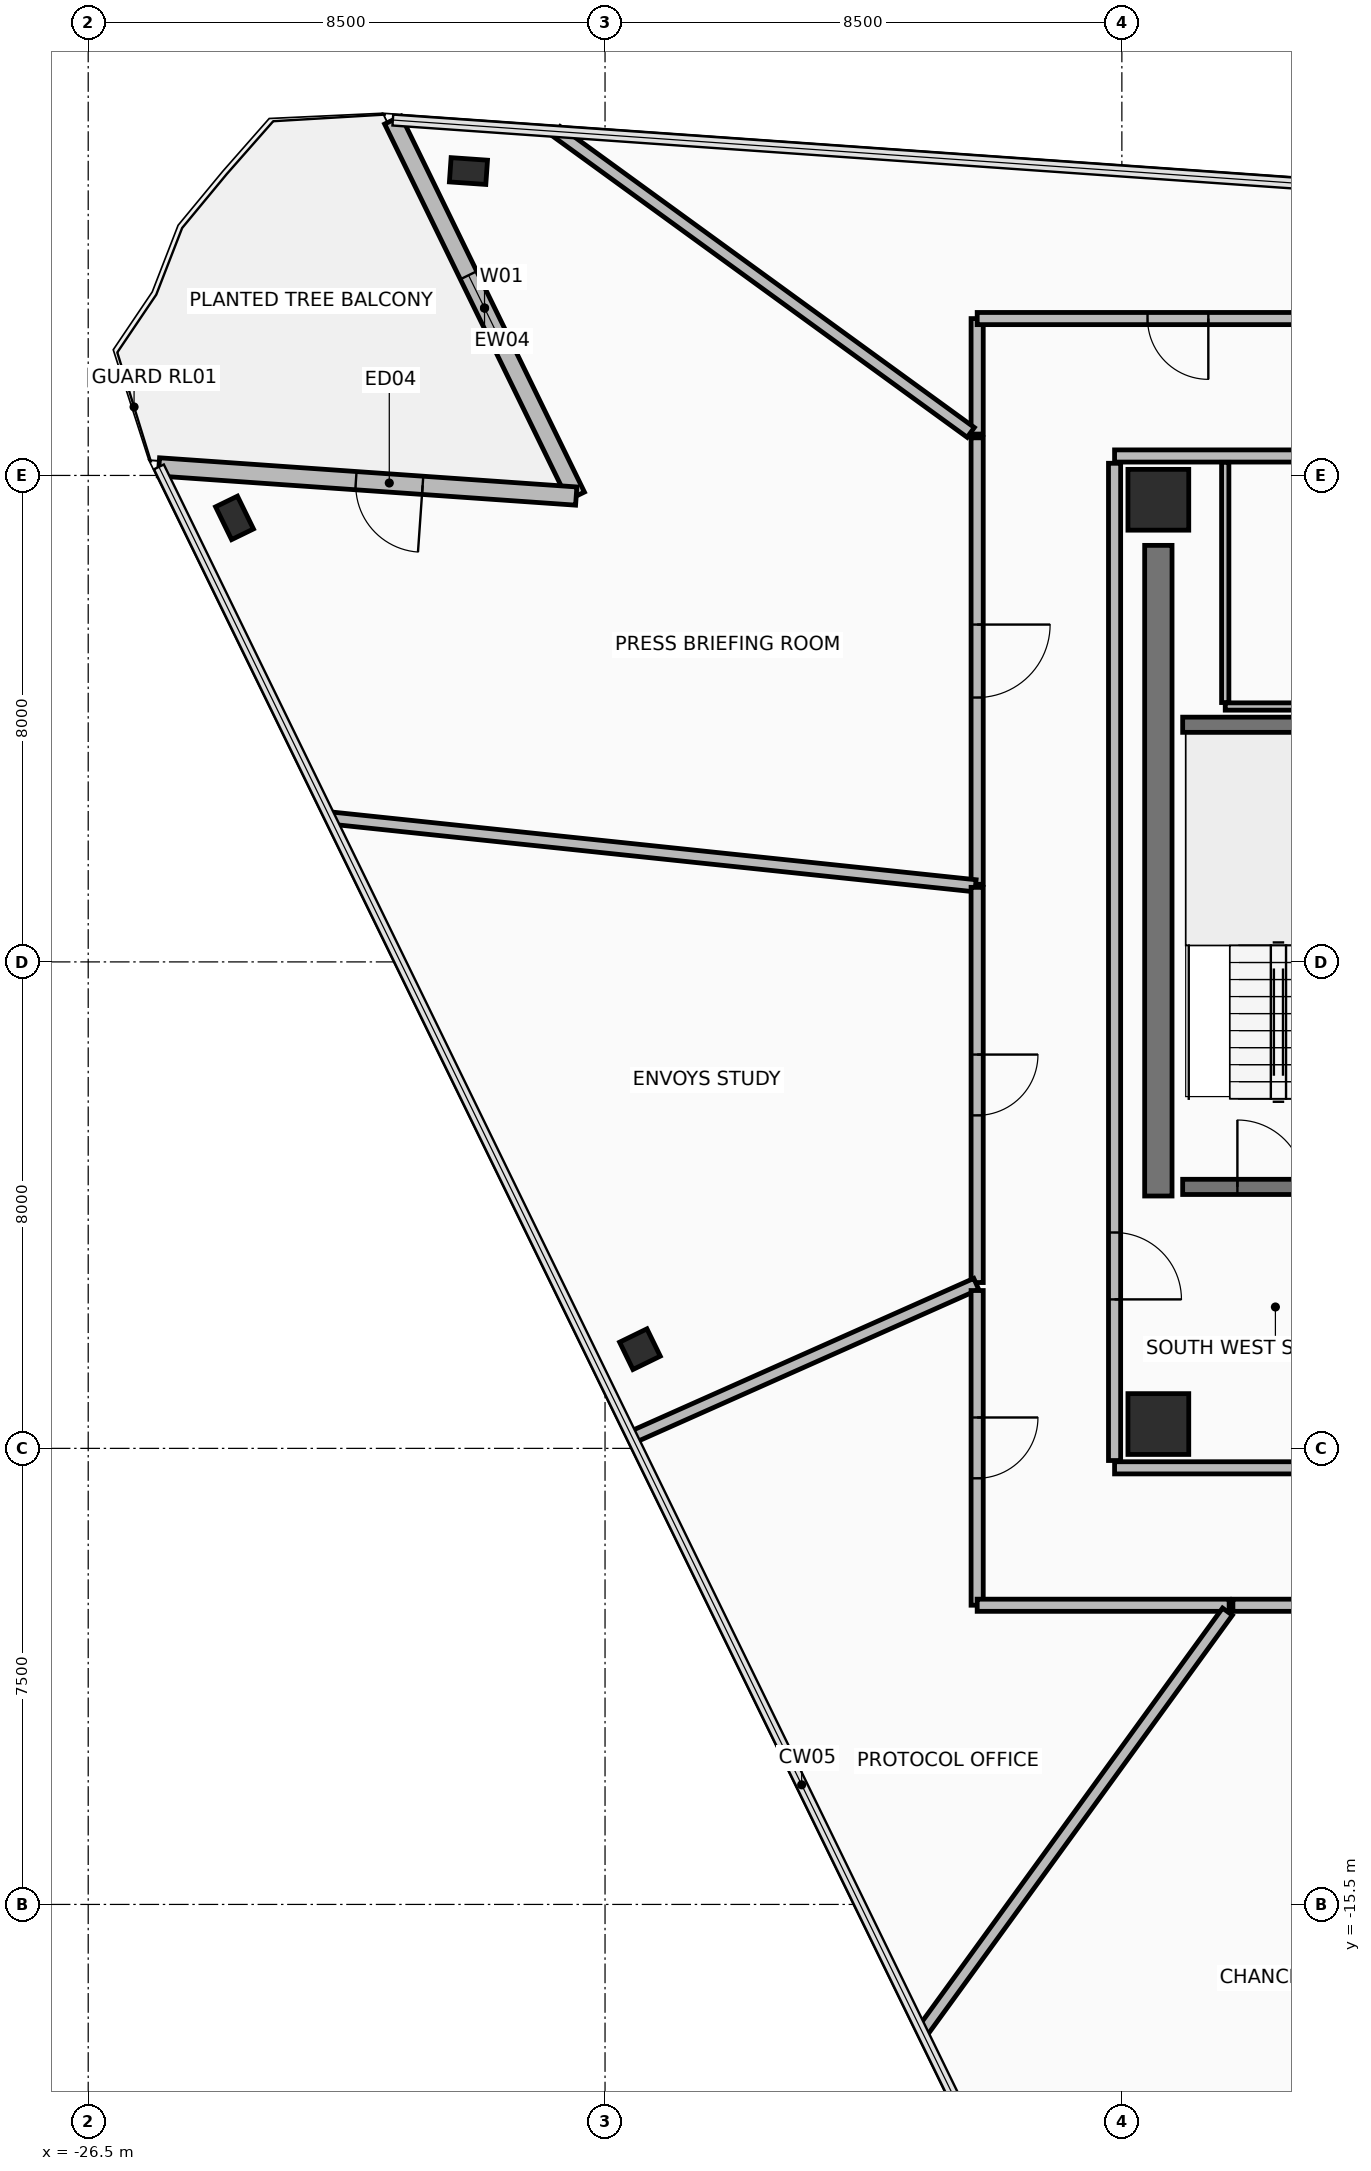
"""IFC4 building model, lengths in metres.
Left out: names, types, materials, properties, quantities, classifications, styles, units other than length and angle.
Written with IfcOpenShell. Run it as: python <this file> out.ifc"""

import sys

from ifc_helpers import new_model, si_unit, direction, frame, frame_2d, origin, origin_2d, place, context, subcontext, project, spatial, rectangle, hollow_rectangle, extrude, element, fill, save


model = new_model("IFC4")
c1 = context("Model", 3, precision=1e-05, world=origin(), true_north=direction((0.0, 1.0)))
c2 = subcontext(c1, "Body", "Model", "MODEL_VIEW")
j1 = project(units=[si_unit("LENGTHUNIT", "METRE"), si_unit("PLANEANGLEUNIT", "RADIAN")], contexts=[c1])
p1 = place(None, origin())
s1 = spatial("IfcSite", under=j1, at=p1, CompositionType="ELEMENT")
p2 = place(p1, origin())
s2 = spatial("IfcBuilding", under=s1, at=p2, CompositionType="ELEMENT")
p3 = place(p2, frame((0.0, 0.0, 227.05)))
s3 = spatial("IfcBuildingStorey", under=s2, at=p3, CompositionType="ELEMENT", Elevation=227.05)
for number, where, z_axis, x_axis in (
    (1, (-8.9, -7.6, 0.0), (0.0, 0.0, 1.0), (1.0, 0.0, 0.0)),
    (2, (-8.9, 7.6, 0.0), (0.0, 0.0, 1.0), (1.0, 0.0, 0.0)),
):
    element("IfcColumn", number, at=place(p3, frame(where, z_axis=z_axis, x_axis=x_axis)), inside=s3, PredefinedType="COLUMN", context=c2, shape_type="SweptSolid", body=[
        extrude(rectangle(XDim=1.0, YDim=1.0, at=origin_2d()), origin(), (0.0, 0.0, 1.0), 3.6),
    ])
p4 = place(p3, frame((-24.094, 7.302, -0.19), z_axis=(0.0, 0.0, 1.0), x_axis=(-0.438371146789, 0.898794046299, 0.0)))
e3 = element("IfcColumn", 3, at=p4, inside=s3, PredefinedType="COLUMN", context=c2, shape_type="SweptSolid", body=[
    extrude(hollow_rectangle(XDim=0.4, YDim=0.6, WallThickness=0.03, at=origin_2d()), origin(), (0.0, 0.0, 1.0), 3.79),
])
p5 = place(p3, frame((-17.426, -6.369, -0.19), z_axis=(0.0, 0.0, 1.0), x_axis=(-0.438371146789, 0.898794046299, 0.0)))
e4 = element("IfcColumn", 4, at=p5, inside=s3, PredefinedType="COLUMN", context=c2, shape_type="SweptSolid", body=[
    extrude(hollow_rectangle(XDim=0.5, YDim=0.5, WallThickness=0.032, at=origin_2d()), origin(), (0.0, 0.0, 1.0), 3.79),
])
p6 = place(p3, frame((-20.246, 13.006, 0.0), z_axis=(0.0, 0.0, 1.0), x_axis=(-0.99756405026, 0.069756473744, 0.0)))
e5 = element("IfcColumn", 5, at=p6, inside=s3, PredefinedType="COLUMN", context=c2, shape_type="SweptSolid", body=[
    extrude(hollow_rectangle(XDim=0.4, YDim=0.6, WallThickness=0.03, at=origin_2d()), origin(), (0.0, 0.0, 1.0), 3.6),
])
p7 = place(p3, frame((-21.49, 13.844, 0.0), z_axis=(0.0, 0.0, 1.0), x_axis=(0.438391471143, -0.898784133165, 0.0)))
e6 = element("IfcWall", 6, at=p7, inside=s3, PredefinedType="STANDARD", context=c2, shape_type="SweptSolid", body=[
    extrude(rectangle(XDim=6.88, YDim=0.3, at=frame_2d((3.44, 0.0))), origin(), (0.0, 0.0, 1.0), 2.765),
])
p8 = place(p7, frame((2.84, 0.0, 0.485)))
e7 = element("IfcOpeningElement", 7, at=p8, cuts=e6, PredefinedType="OPENING", context=c2, shape_type="SweptSolid", body=[
    extrude(rectangle(XDim=1.2, YDim=2.1, at=frame_2d((0.6, 1.05))), frame((0.0, 0.16, 0.0), z_axis=(0.0, -1.0, 0.0), x_axis=(1.0, 0.0, 0.0)), (0.0, 0.0, 1.0), 0.32),
])
p9 = place(p3, frame((-18.474, 7.661, 0.0), z_axis=(0.0, 0.0, 1.0), x_axis=(-0.997565982203, 0.069728840176, 0.0)))
e8 = element("IfcWall", 8, at=p9, inside=s3, PredefinedType="STANDARD", context=c2, shape_type="SweptSolid", body=[
    extrude(rectangle(XDim=6.88, YDim=0.3, at=frame_2d((3.44, 0.0))), origin(), (0.0, 0.0, 1.0), 2.765),
])
p10 = place(p9, frame((2.532, 0.0, 0.0)))
e9 = element("IfcOpeningElement", 9, at=p10, cuts=e8, PredefinedType="OPENING", context=c2, shape_type="SweptSolid", body=[
    extrude(rectangle(XDim=1.1, YDim=2.2, at=frame_2d((0.55, 1.1))), frame((0.0, 0.16, 0.0), z_axis=(0.0, -1.0, 0.0), x_axis=(1.0, 0.0, 0.0)), (0.0, 0.0, 1.0), 0.32),
])
p11 = place(p3, frame((-8.9, -3.85, 0.0), z_axis=(0.0, 0.0, 1.0), x_axis=(0.0, 1.0, 0.0)))
e10 = element("IfcWall", 10, at=p11, inside=s3, PredefinedType="SHEAR", context=c2, shape_type="SweptSolid", body=[
    extrude(rectangle(XDim=10.7, YDim=0.45, at=frame_2d((5.35, 0.0))), origin(), (0.0, 0.0, 1.0), 3.42),
])
p12 = place(p3, frame((-9.62, -8.32, 0.0), z_axis=(0.0, 0.0, 1.0), x_axis=(1.0, 0.0, 0.0)))
e11 = element("IfcWall", 11, at=p12, inside=s3, PredefinedType="PARTITIONING", context=c2, shape_type="SweptSolid", body=[
    extrude(rectangle(XDim=19.24, YDim=0.2, at=frame_2d((9.62, 0.0))), origin(), (0.0, 0.0, 1.0), 2.915),
])
p13 = place(p12, frame((7.37, 0.0, 0.0)))
e12 = element("IfcOpeningElement", 12, at=p13, cuts=e11, PredefinedType="OPENING", context=c2, shape_type="SweptSolid", body=[
    extrude(rectangle(XDim=0.9, YDim=2.1, at=frame_2d((0.45, 1.05))), frame((0.0, 0.11, 0.0), z_axis=(0.0, -1.0, 0.0), x_axis=(1.0, 0.0, 0.0)), (0.0, 0.0, 1.0), 0.22),
])
p14 = place(p12, frame((10.77, 0.0, 0.0)))
e13 = element("IfcOpeningElement", 13, at=p14, cuts=e11, PredefinedType="OPENING", context=c2, shape_type="SweptSolid", body=[
    extrude(rectangle(XDim=0.9, YDim=2.1, at=frame_2d((0.45, 1.05))), frame((0.0, 0.11, 0.0), z_axis=(0.0, -1.0, 0.0), x_axis=(1.0, 0.0, 0.0)), (0.0, 0.0, 1.0), 0.22),
])
p15 = place(p3, frame((9.62, 8.32, 0.0), z_axis=(0.0, 0.0, 1.0), x_axis=(-1.0, 0.0, 0.0)))
e14 = element("IfcWall", 14, at=p15, inside=s3, PredefinedType="PARTITIONING", context=c2, shape_type="SweptSolid", body=[
    extrude(rectangle(XDim=19.24, YDim=0.2, at=frame_2d((9.62, 0.0))), origin(), (0.0, 0.0, 1.0), 2.915),
])
p16 = place(p15, frame((10.97, 0.0, 0.0)))
e15 = element("IfcOpeningElement", 15, at=p16, cuts=e14, PredefinedType="OPENING", context=c2, shape_type="SweptSolid", body=[
    extrude(rectangle(XDim=0.9, YDim=2.1, at=frame_2d((0.45, 1.05))), frame((0.0, 0.11, 0.0), z_axis=(0.0, -1.0, 0.0), x_axis=(1.0, 0.0, 0.0)), (0.0, 0.0, 1.0), 0.22),
])
p17 = place(p15, frame((7.57, 0.0, 0.0)))
e16 = element("IfcOpeningElement", 16, at=p17, cuts=e14, PredefinedType="OPENING", context=c2, shape_type="SweptSolid", body=[
    extrude(rectangle(XDim=0.9, YDim=2.1, at=frame_2d((0.45, 1.05))), frame((0.0, 0.11, 0.0), z_axis=(0.0, -1.0, 0.0), x_axis=(1.0, 0.0, 0.0)), (0.0, 0.0, 1.0), 0.22),
])
p18 = place(p15, frame((15.02, 0.0, 0.0)))
e17 = element("IfcOpeningElement", 17, at=p18, cuts=e14, PredefinedType="OPENING", context=c2, shape_type="SweptSolid", body=[
    extrude(rectangle(XDim=0.9, YDim=2.1, at=frame_2d((0.45, 1.05))), frame((0.0, 0.11, 0.0), z_axis=(0.0, -1.0, 0.0), x_axis=(1.0, 0.0, 0.0)), (0.0, 0.0, 1.0), 0.22),
])
p19 = place(p3, frame((-9.62, 8.2, 0.0), z_axis=(0.0, 0.0, 1.0), x_axis=(0.0, -1.0, 0.0)))
e18 = element("IfcWall", 18, at=p19, inside=s3, PredefinedType="PARTITIONING", context=c2, shape_type="SweptSolid", body=[
    extrude(rectangle(XDim=16.4, YDim=0.2, at=frame_2d((8.2, 0.0))), origin(), (0.0, 0.0, 1.0), 2.765),
])
p20 = place(p19, frame((12.65, 0.0, 0.0)))
e19 = element("IfcOpeningElement", 19, at=p20, cuts=e18, PredefinedType="OPENING", context=c2, shape_type="SweptSolid", body=[
    extrude(rectangle(XDim=1.1, YDim=2.15, at=frame_2d((0.55, 1.075))), frame((0.0, 0.11, 0.0), z_axis=(0.0, -1.0, 0.0), x_axis=(1.0, 0.0, 0.0)), (0.0, 0.0, 1.0), 0.22),
])
p21 = place(p3, frame((-8.5, -3.7, 0.0), z_axis=(0.0, 0.0, 1.0), x_axis=(1.0, 0.0, 0.0)))
e20 = element("IfcWall", 20, at=p21, inside=s3, PredefinedType="SHEAR", context=c2, shape_type="SweptSolid", body=[
    extrude(rectangle(XDim=2.95, YDim=0.25, at=frame_2d((1.475, 0.0))), origin(), (0.0, 0.0, 1.0), 3.42),
])
p22 = place(p21, frame((0.9, 0.0, 0.0)))
e21 = element("IfcOpeningElement", 21, at=p22, cuts=e20, PredefinedType="OPENING", context=c2, shape_type="SweptSolid", body=[
    extrude(rectangle(XDim=1.1, YDim=2.15, at=frame_2d((0.55, 1.075))), frame((0.0, 0.135, 0.0), z_axis=(0.0, -1.0, 0.0), x_axis=(1.0, 0.0, 0.0)), (0.0, 0.0, 1.0), 0.27),
])
p23 = place(p3, frame((-8.5, 3.9, 0.0), z_axis=(0.0, 0.0, 1.0), x_axis=(1.0, 0.0, 0.0)))
e22 = element("IfcWall", 22, at=p23, inside=s3, PredefinedType="SHEAR", context=c2, shape_type="SweptSolid", body=[
    extrude(rectangle(XDim=2.95, YDim=0.25, at=frame_2d((1.475, 0.0))), origin(), (0.0, 0.0, 1.0), 3.42),
])
p24 = place(p3, frame((-7.8, 4.2, 0.0), z_axis=(0.0, 0.0, 1.0), x_axis=(1.0, 0.0, 0.0)))
e23 = element("IfcWall", 23, at=p24, inside=s3, PredefinedType="PARTITIONING", context=c2, shape_type="SweptSolid", body=[
    extrude(rectangle(XDim=3.9, YDim=0.12, at=frame_2d((1.95, 0.0))), origin(), (0.0, 0.0, 1.0), 3.42),
])
p25 = place(p3, frame((-7.8, 8.215, 0.0), z_axis=(0.0, 0.0, 1.0), x_axis=(0.0, -1.0, 0.0)))
e24 = element("IfcWall", 24, at=p25, inside=s3, PredefinedType="PARTITIONING", context=c2, shape_type="SweptSolid", body=[
    extrude(rectangle(XDim=3.95, YDim=0.12, at=frame_2d((1.975, 0.0))), origin(), (0.0, 0.0, 1.0), 2.715),
])
p26 = place(p3, frame((-11.88, 10.579, 0.0), z_axis=(0.0, 0.0, 1.0), x_axis=(0.0, -1.0, 0.0)))
e25 = element("IfcWall", 25, at=p26, inside=s3, PredefinedType="PARTITIONING", context=c2, shape_type="SweptSolid", body=[
    extrude(rectangle(XDim=1.899, YDim=0.2, at=frame_2d((0.949, 0.0))), origin(), (0.0, 0.0, 1.0), 2.915),
])
p27 = place(p3, frame((-11.985, 8.708, 0.0), z_axis=(0.0, 0.0, 1.0), x_axis=(-0.809008125834, 0.587797458599, 0.0)))
e26 = element("IfcWall", 26, at=p27, inside=s3, PredefinedType="PARTITIONING", context=c2, shape_type="SweptSolid", body=[
    extrude(rectangle(XDim=8.419, YDim=0.2, at=frame_2d((4.209, 0.0))), origin(), (0.0, 0.0, 1.0), 2.765),
])
p28 = place(p3, frame((-5.277, 10.58, 0.0), z_axis=(0.0, 0.0, 1.0), x_axis=(-1.0, 0.0, 0.0)))
e27 = element("IfcWall", 27, at=p28, inside=s3, PredefinedType="PARTITIONING", context=c2, shape_type="SweptSolid", body=[
    extrude(rectangle(XDim=6.602, YDim=0.2, at=frame_2d((3.301, 0.0))), origin(), (0.0, 0.0, 1.0), 2.915),
])
p29 = place(p28, frame((2.801, 0.0, 0.0)))
e28 = element("IfcOpeningElement", 28, at=p29, cuts=e27, PredefinedType="OPENING", context=c2, shape_type="SweptSolid", body=[
    extrude(rectangle(XDim=1.0, YDim=2.15, at=frame_2d((0.5, 1.075))), frame((0.0, 0.11, 0.0), z_axis=(0.0, -1.0, 0.0), x_axis=(1.0, 0.0, 0.0)), (0.0, 0.0, 1.0), 0.22),
])
p30 = place(p3, frame((-11.88, 8.619, 0.0), z_axis=(0.0, 0.0, 1.0), x_axis=(0.0, -1.0, 0.0)))
e29 = element("IfcWall", 29, at=p30, inside=s3, PredefinedType="PARTITIONING", context=c2, shape_type="SweptSolid", body=[
    extrude(rectangle(XDim=7.342, YDim=0.2, at=frame_2d((3.671, 0.0))), origin(), (0.0, 0.0, 1.0), 2.765),
])
p31 = place(p30, frame((3.071, 0.0, 0.0)))
e30 = element("IfcOpeningElement", 30, at=p31, cuts=e29, PredefinedType="OPENING", context=c2, shape_type="SweptSolid", body=[
    extrude(rectangle(XDim=1.2, YDim=2.15, at=frame_2d((0.6, 1.075))), frame((0.0, 0.11, 0.0), z_axis=(0.0, -1.0, 0.0), x_axis=(1.0, 0.0, 0.0)), (0.0, 0.0, 1.0), 0.22),
])
p32 = place(p3, frame((-11.908, 1.251, 0.0), z_axis=(0.0, 0.0, 1.0), x_axis=(-0.994522384662, 0.104523807841, 0.0)))
e31 = element("IfcWall", 31, at=p32, inside=s3, PredefinedType="PARTITIONING", context=c2, shape_type="SweptSolid", body=[
    extrude(rectangle(XDim=10.658, YDim=0.2, at=frame_2d((5.329, 0.0))), origin(), (0.0, 0.0, 1.0), 2.765),
])
p33 = place(p3, frame((-11.88, 1.226, 0.0), z_axis=(0.0, 0.0, 1.0), x_axis=(0.0, -1.0, 0.0)))
e32 = element("IfcWall", 32, at=p33, inside=s3, PredefinedType="PARTITIONING", context=c2, shape_type="SweptSolid", body=[
    extrude(rectangle(XDim=6.499, YDim=0.2, at=frame_2d((3.25, 0.0))), origin(), (0.0, 0.0, 1.0), 3.42),
])
p34 = place(p33, frame((2.75, 0.0, 0.0)))
e33 = element("IfcOpeningElement", 33, at=p34, cuts=e32, PredefinedType="OPENING", context=c2, shape_type="SweptSolid", body=[
    extrude(rectangle(XDim=1.0, YDim=2.15, at=frame_2d((0.5, 1.075))), frame((0.0, 0.11, 0.0), z_axis=(0.0, -1.0, 0.0), x_axis=(1.0, 0.0, 0.0)), (0.0, 0.0, 1.0), 0.22),
])
p35 = place(p3, frame((-11.895, -5.296, 0.0), z_axis=(0.0, 0.0, 1.0), x_axis=(-0.913548703363, -0.406729352991, 0.0)))
e34 = element("IfcWall", 34, at=p35, inside=s3, PredefinedType="PARTITIONING", context=c2, shape_type="SweptSolid", body=[
    extrude(rectangle(XDim=6.171, YDim=0.2, at=frame_2d((3.085, 0.0))), origin(), (0.0, 0.0, 1.0), 2.765),
])
p36 = place(p3, frame((-11.88, -5.404, 0.0), z_axis=(0.0, 0.0, 1.0), x_axis=(0.0, -1.0, 0.0)))
e35 = element("IfcWall", 35, at=p36, inside=s3, PredefinedType="PARTITIONING", context=c2, shape_type="SweptSolid", body=[
    extrude(rectangle(XDim=5.175, YDim=0.2, at=frame_2d((2.587, 0.0))), origin(), (0.0, 0.0, 1.0), 2.915),
])
p37 = place(p36, frame((2.088, 0.0, 0.0)))
e36 = element("IfcOpeningElement", 36, at=p37, cuts=e35, PredefinedType="OPENING", context=c2, shape_type="SweptSolid", body=[
    extrude(rectangle(XDim=1.0, YDim=2.15, at=frame_2d((0.5, 1.075))), frame((0.0, 0.11, 0.0), z_axis=(0.0, -1.0, 0.0), x_axis=(1.0, 0.0, 0.0)), (0.0, 0.0, 1.0), 0.22),
])
p38 = place(p3, frame((-11.879, -10.58, 0.0), z_axis=(0.0, 0.0, 1.0), x_axis=(1.0, 0.0, 0.0)))
e37 = element("IfcWall", 37, at=p38, inside=s3, PredefinedType="PARTITIONING", context=c2, shape_type="SweptSolid", body=[
    extrude(rectangle(XDim=4.144, YDim=0.2, at=frame_2d((2.072, 0.0))), origin(), (0.0, 0.0, 1.0), 2.915),
])
p39 = place(p3, frame((-7.763, -10.685, 0.0), z_axis=(0.0, 0.0, 1.0), x_axis=(-0.587785890463, -0.809016530716, 0.0)))
e38 = element("IfcWall", 38, at=p39, inside=s3, PredefinedType="PARTITIONING", context=c2, shape_type="SweptSolid", body=[
    extrude(rectangle(XDim=8.543, YDim=0.2, at=frame_2d((4.271, 0.0))), origin(), (0.0, 0.0, 1.0), 2.765),
])
p40 = place(p3, frame((-7.674, -10.58, 0.0), z_axis=(0.0, 0.0, 1.0), x_axis=(1.0, 0.0, 0.0)))
e39 = element("IfcWall", 39, at=p40, inside=s3, PredefinedType="PARTITIONING", context=c2, shape_type="SweptSolid", body=[
    extrude(rectangle(XDim=6.534, YDim=0.2, at=frame_2d((3.267, 0.0))), origin(), (0.0, 0.0, 1.0), 2.915),
])
p41 = place(p40, frame((2.767, 0.0, 0.0)))
e40 = element("IfcOpeningElement", 40, at=p41, cuts=e39, PredefinedType="OPENING", context=c2, shape_type="SweptSolid", body=[
    extrude(rectangle(XDim=1.0, YDim=2.15, at=frame_2d((0.5, 1.075))), frame((0.0, 0.11, 0.0), z_axis=(0.0, -1.0, 0.0), x_axis=(1.0, 0.0, 0.0)), (0.0, 0.0, 1.0), 0.22),
])
p42 = place(p10, origin())
e41 = element("IfcDoor", 41, at=p42, inside=s3, OperationType="SINGLE_SWING_LEFT", PredefinedType="DOOR", context=c2, shape_type="SweptSolid", body=[
    extrude(rectangle(XDim=1.1, YDim=2.2, at=frame_2d((0.55, 1.1))), frame((0.0, 0.025, 0.0), z_axis=(0.0, -1.0, 0.0), x_axis=(1.0, 0.0, 0.0)), (0.0, 0.0, 1.0), 0.05),
])
fill(e9, e41)
p43 = place(p8, origin())
e42 = element("IfcWindow", 42, at=p43, inside=s3, PartitioningType="SINGLE_PANEL", PredefinedType="WINDOW", context=c2, shape_type="SweptSolid", body=[
    extrude(rectangle(XDim=1.2, YDim=2.1, at=frame_2d((0.6, 1.05))), frame((0.0, 0.03, 0.0), z_axis=(0.0, -1.0, 0.0), x_axis=(1.0, 0.0, 0.0)), (0.0, 0.0, 1.0), 0.06),
])
fill(e7, e42)
p44 = place(p20, frame((1.1, 0.0, 0.0), z_axis=(0.0, 0.0, 1.0), x_axis=(-1.0, 0.0, 0.0)))
e43 = element("IfcDoor", 43, at=p44, inside=s3, OperationType="SINGLE_SWING_LEFT", PredefinedType="DOOR", context=c2, shape_type="SweptSolid", body=[
    extrude(rectangle(XDim=1.1, YDim=2.15, at=frame_2d((0.55, 1.075))), frame((0.0, 0.025, 0.0), z_axis=(0.0, -1.0, 0.0), x_axis=(1.0, 0.0, 0.0)), (0.0, 0.0, 1.0), 0.05),
])
fill(e19, e43)
p45 = place(p22, origin())
e44 = element("IfcDoor", 44, at=p45, inside=s3, OperationType="SINGLE_SWING_LEFT", PredefinedType="DOOR", context=c2, shape_type="SweptSolid", body=[
    extrude(rectangle(XDim=1.1, YDim=2.15, at=frame_2d((0.55, 1.075))), frame((0.0, 0.025, 0.0), z_axis=(0.0, -1.0, 0.0), x_axis=(1.0, 0.0, 0.0)), (0.0, 0.0, 1.0), 0.05),
])
fill(e21, e44)
p46 = place(p29, origin())
e45 = element("IfcDoor", 45, at=p46, inside=s3, OperationType="SINGLE_SWING_RIGHT", PredefinedType="DOOR", context=c2, shape_type="SweptSolid", body=[
    extrude(rectangle(XDim=1.0, YDim=2.15, at=frame_2d((0.5, 1.075))), frame((0.0, 0.025, 0.0), z_axis=(0.0, -1.0, 0.0), x_axis=(1.0, 0.0, 0.0)), (0.0, 0.0, 1.0), 0.05),
])
fill(e28, e45)
p47 = place(p31, origin())
e46 = element("IfcDoor", 46, at=p47, inside=s3, OperationType="SINGLE_SWING_LEFT", PredefinedType="DOOR", context=c2, shape_type="SweptSolid", body=[
    extrude(rectangle(XDim=1.2, YDim=2.15, at=frame_2d((0.6, 1.075))), frame((0.0, 0.025, 0.0), z_axis=(0.0, -1.0, 0.0), x_axis=(1.0, 0.0, 0.0)), (0.0, 0.0, 1.0), 0.05),
])
fill(e30, e46)
p48 = place(p34, origin())
e47 = element("IfcDoor", 47, at=p48, inside=s3, OperationType="SINGLE_SWING_RIGHT", PredefinedType="DOOR", context=c2, shape_type="SweptSolid", body=[
    extrude(rectangle(XDim=1.0, YDim=2.15, at=frame_2d((0.5, 1.075))), frame((0.0, 0.025, 0.0), z_axis=(0.0, -1.0, 0.0), x_axis=(1.0, 0.0, 0.0)), (0.0, 0.0, 1.0), 0.05),
])
fill(e33, e47)
p49 = place(p37, origin())
e48 = element("IfcDoor", 48, at=p49, inside=s3, OperationType="SINGLE_SWING_RIGHT", PredefinedType="DOOR", context=c2, shape_type="SweptSolid", body=[
    extrude(rectangle(XDim=1.0, YDim=2.15, at=frame_2d((0.5, 1.075))), frame((0.0, 0.025, 0.0), z_axis=(0.0, -1.0, 0.0), x_axis=(1.0, 0.0, 0.0)), (0.0, 0.0, 1.0), 0.05),
])
fill(e36, e48)
save(model, sys.argv[1])
